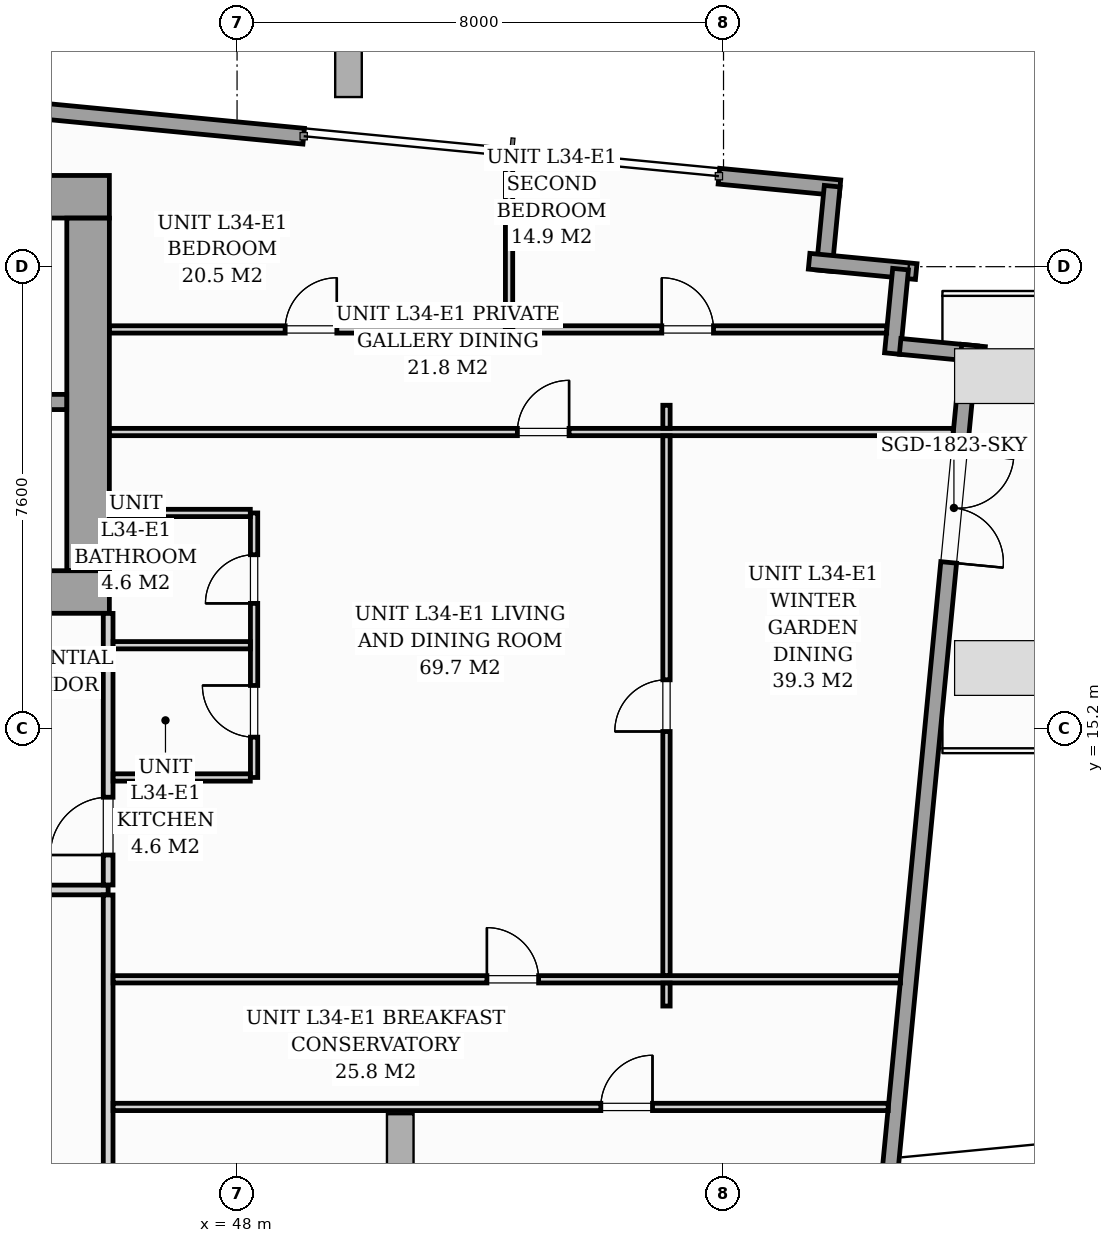
"""IFC4 building model, lengths in metres.
Left out: names, types, materials, properties, quantities, classifications, styles, units other than length and angle.
Written with IfcOpenShell. Run it as: python <this file> out.ifc"""

import sys

from ifc_helpers import new_model, si_unit, direction, frame, frame_2d, origin, origin_2d, place, context, subcontext, project, spatial, rectangle, i_section, extrude, source, transform, mapped, element, fill, save


model = new_model("IFC4")
c1 = context("Model", 3, precision=1e-05, world=origin(), true_north=direction((0.0, 1.0)))
c2 = subcontext(c1, "Body", "Model", "MODEL_VIEW")
j1 = project(units=[si_unit("LENGTHUNIT", "METRE"), si_unit("PLANEANGLEUNIT", "RADIAN")], contexts=[c1])
p1 = place(None, origin())
s1 = spatial("IfcSite", under=j1, at=p1, CompositionType="ELEMENT")
p2 = place(p1, origin())
s2 = spatial("IfcBuilding", under=s1, at=p2, CompositionType="ELEMENT")
p3 = place(p2, frame((0.0, 0.0, 119.4)))
s3 = spatial("IfcBuildingStorey", under=s2, at=p3, CompositionType="ELEMENT", Elevation=119.4)
m1 = source(origin(), c2, "Body", "SweptSolid", [
    extrude(i_section(OverallWidth=0.421, OverallDepth=0.465, WebThickness=0.045, FlangeThickness=0.073, FilletRadius=0.018, at=origin_2d()), origin(), (0.0, 0.0, 1.0), 5.196),
])
for number, where, z_axis, x_axis in (
    (1, (45.6, 17.4, 0.002), (0.0, 0.0, 1.0), (1.0, 0.0, 0.0)),
    (2, (45.6, 24.0, 0.002), (0.0, 0.0, 1.0), (1.0, 0.0, 0.0)),
):
    element("IfcColumn", number, at=place(p3, frame(where, z_axis=z_axis, x_axis=x_axis)), inside=s3, PredefinedType="PILASTER", context=c2, shape_type="MappedRepresentation", body=[
        mapped(m1, transform((0.0, 0.0, 0.0), scale=1.0)),
    ])
m2 = source(origin(), c2, "Body", "SweptSolid", [
    extrude(i_section(OverallWidth=0.438, OverallDepth=1.011, WebThickness=0.041, FlangeThickness=0.074, FilletRadius=0.024, at=origin_2d()), origin(), (0.0, 0.0, 1.0), 9.879),
])
p4 = place(p3, frame((52.668, 8.704, 0.208), z_axis=(-0.883824382848, -0.154157714467, 0.44168977728), x_axis=(0.435120582334, 0.075894256588, 0.897167844189)))
e3 = element("IfcColumn", 3, at=p4, inside=s3, PredefinedType="COLUMN", context=c2, shape_type="MappedRepresentation", body=[
    mapped(m2, transform((0.0, 0.0, 0.0), scale=1.0)),
])
m3 = source(origin(), c2, "Body", "SweptSolid", [
    extrude(i_section(OverallWidth=0.438, OverallDepth=1.011, WebThickness=0.041, FlangeThickness=0.074, FilletRadius=0.024, at=origin_2d()), origin(), (0.0, 0.0, 1.0), 11.564),
])
p5 = place(p3, frame((65.628, 9.851, 0.215), z_axis=(-0.870363070026, -0.31765876899, 0.376245973825), x_axis=(0.353441551534, 0.128996521149, 0.92651981478)))
e4 = element("IfcColumn", 4, at=p5, inside=s3, PredefinedType="COLUMN", context=c2, shape_type="MappedRepresentation", body=[
    mapped(m3, transform((0.0, 0.0, 0.0), scale=1.0)),
])
m4 = source(origin(), c2, "Body", "SweptSolid", [
    extrude(i_section(OverallWidth=0.438, OverallDepth=1.011, WebThickness=0.041, FlangeThickness=0.074, FilletRadius=0.024, at=origin_2d()), origin(), (0.0, 0.0, 1.0), 7.288),
])
p6 = place(p3, frame((51.152, 26.298, 0.186), z_axis=(-0.787175284288, -0.120828173558, 0.604777334463), x_axis=(0.597776232885, 0.091756196945, 0.796394610554)))
e5 = element("IfcColumn", 5, at=p6, inside=s3, PredefinedType="COLUMN", context=c2, shape_type="MappedRepresentation", body=[
    mapped(m4, transform((0.0, 0.0, 0.0), scale=1.0)),
])
m5 = source(origin(), c2, "Body", "SweptSolid", [
    extrude(i_section(OverallWidth=0.438, OverallDepth=1.011, WebThickness=0.041, FlangeThickness=0.074, FilletRadius=0.024, at=origin_2d()), origin(), (0.0, 0.0, 1.0), 9.236),
])
p7 = place(p3, frame((64.104, 27.401, 0.205), z_axis=(-0.763784492076, -0.438952046894, 0.473238153779), x_axis=(0.410305135913, 0.235805100953, 0.880934532078)))
e6 = element("IfcColumn", 6, at=p7, inside=s3, PredefinedType="COLUMN", context=c2, shape_type="MappedRepresentation", body=[
    mapped(m5, transform((0.0, 0.0, 0.0), scale=1.0)),
])
m6 = source(origin(), c2, "Body", "SweptSolid", [
    extrude(i_section(OverallWidth=0.438, OverallDepth=1.011, WebThickness=0.041, FlangeThickness=0.074, FilletRadius=0.024, at=origin_2d()), origin(), (0.0, 0.0, 1.0), 10.513),
])
p8 = place(p3, frame((67.234, 18.832, 0.211), z_axis=(-0.814030906227, -0.406829664935, 0.414539874362), x_axis=(0.370809581497, 0.18532016001, 0.910031149227)))
e7 = element("IfcColumn", 7, at=p8, inside=s3, PredefinedType="COLUMN", context=c2, shape_type="MappedRepresentation", body=[
    mapped(m6, transform((0.0, 0.0, 0.0), scale=1.0)),
])
p9 = place(p3, frame((44.268, 25.41, 0.0), z_axis=(0.0, 0.0, 1.0), x_axis=(0.995396292684, -0.095844772998, 0.0)))
e8 = element("IfcWall", 8, at=p9, inside=s3, PredefinedType="STANDARD", context=c2, shape_type="SweptSolid", body=[
    extrude(rectangle(XDim=4.85, YDim=0.26, at=frame_2d((2.425, 0.0))), origin(), (0.0, 0.0, 1.0), 4.78),
])
p10 = place(p3, frame((55.924, 24.288, 0.0), z_axis=(0.0, 0.0, 1.0), x_axis=(0.995396717965, -0.095840356139, 0.0)))
e9 = element("IfcWall", 9, at=p10, inside=s3, PredefinedType="STANDARD", context=c2, shape_type="SweptSolid", body=[
    extrude(rectangle(XDim=2.0, YDim=0.26, at=frame_2d((1.0, 0.0))), origin(), (0.0, 0.0, 1.0), 4.78),
])
p11 = place(p3, frame((57.787, 24.124, 0.0), z_axis=(0.0, 0.0, 1.0), x_axis=(-0.095915846097, -0.995389446633, 0.0)))
e10 = element("IfcWall", 10, at=p11, inside=s3, PredefinedType="STANDARD", context=c2, shape_type="SweptSolid", body=[
    extrude(rectangle(XDim=1.395, YDim=0.26, at=frame_2d((0.697, 0.0))), origin(), (0.0, 0.0, 1.0), 4.78),
])
p12 = place(p3, frame((57.407, 22.889, 0.0), z_axis=(0.0, 0.0, 1.0), x_axis=(0.995404477441, -0.095759732096, 0.0)))
e11 = element("IfcWall", 11, at=p12, inside=s3, PredefinedType="STANDARD", context=c2, shape_type="SweptSolid", body=[
    extrude(rectangle(XDim=1.769, YDim=0.26, at=frame_2d((0.885, 0.0))), origin(), (0.0, 0.0, 1.0), 4.78),
])
for number, where, z_axis, x_axis in (
    (12, (58.912, 22.76, 0.0), (0.0, 0.0, 1.0), (-0.096, -0.995, 0.0)),
    (13, (58.905, 21.49, 0.0), (0.0, 0.0, 1.0), (0.995, -0.096, 0.0)),
):
    element("IfcWall", number, at=place(p3, frame(where, z_axis=z_axis, x_axis=x_axis)), inside=s3, PredefinedType="STANDARD", context=c2, shape_type="SweptSolid", body=[
        extrude(rectangle(XDim=1.395, YDim=0.26, at=frame_2d((0.698, 0.0))), origin(), (0.0, 0.0, 1.0), 4.78),
    ])
p13 = place(p3, frame((60.047, 21.51, 0.0), z_axis=(0.0, 0.0, 1.0), x_axis=(-0.095849096434, -0.995395876379, 0.0)))
e14 = element("IfcWall", 14, at=p13, inside=s3, PredefinedType="STANDARD", context=c2, shape_type="SweptSolid", body=[
    extrude(rectangle(XDim=14.6, YDim=0.26, at=frame_2d((7.3, 0.0))), origin(), (0.0, 0.0, 1.0), 4.78),
])
p14 = place(p13, frame((1.79, 0.0, 0.0)))
e15 = element("IfcOpeningElement", 15, at=p14, cuts=e14, PredefinedType="OPENING", context=c2, shape_type="SweptSolid", body=[
    extrude(rectangle(XDim=1.8, YDim=2.1, at=frame_2d((0.9, 1.05))), frame((0.0, 0.14, 0.0), z_axis=(0.0, -1.0, 0.0), x_axis=(1.0, 0.0, 0.0)), (0.0, 0.0, 1.0), 0.28),
])
p15 = place(p3, frame((26.1, 17.45, 0.0), z_axis=(0.0, 0.0, 1.0), x_axis=(1.0, 0.0, 0.0)))
e16 = element("IfcWall", 16, at=p15, inside=s3, PredefinedType="SHEAR", context=c2, shape_type="SweptSolid", body=[
    extrude(rectangle(XDim=19.8, YDim=0.7, at=frame_2d((9.9, 0.0))), origin(), (0.0, 0.0, 1.0), 5.2),
])
p16 = place(p15, frame((1.05, 0.0, 0.0)))
e17 = element("IfcOpeningElement", 17, at=p16, cuts=e16, PredefinedType="OPENING", context=c2, shape_type="SweptSolid", body=[
    extrude(rectangle(XDim=0.95, YDim=2.06, at=frame_2d((0.475, 1.03))), frame((0.0, 0.36, 0.0), z_axis=(0.0, -1.0, 0.0), x_axis=(1.0, 0.0, 0.0)), (0.0, 0.0, 1.0), 0.72),
])
p17 = place(p15, frame((9.48, 0.0, 0.0)))
e18 = element("IfcOpeningElement", 18, at=p17, cuts=e16, PredefinedType="OPENING", context=c2, shape_type="SweptSolid", body=[
    extrude(rectangle(XDim=0.9, YDim=2.06, at=frame_2d((0.45, 1.03))), frame((0.0, 0.36, 0.0), z_axis=(0.0, -1.0, 0.0), x_axis=(1.0, 0.0, 0.0)), (0.0, 0.0, 1.0), 0.72),
])
p18 = place(p15, frame((17.65, 0.0, 0.0)))
e19 = element("IfcOpeningElement", 19, at=p18, cuts=e16, PredefinedType="OPENING", context=c2, shape_type="SweptSolid", body=[
    extrude(rectangle(XDim=0.95, YDim=2.06, at=frame_2d((0.475, 1.03))), frame((0.0, 0.36, 0.0), z_axis=(0.0, -1.0, 0.0), x_axis=(1.0, 0.0, 0.0)), (0.0, 0.0, 1.0), 0.72),
])
p19 = place(p3, frame((26.1, 23.95, 0.0), z_axis=(0.0, 0.0, 1.0), x_axis=(1.0, 0.0, 0.0)))
e20 = element("IfcWall", 20, at=p19, inside=s3, PredefinedType="SHEAR", context=c2, shape_type="SweptSolid", body=[
    extrude(rectangle(XDim=19.8, YDim=0.7, at=frame_2d((9.9, 0.0))), origin(), (0.0, 0.0, 1.0), 5.2),
])
p20 = place(p3, frame((45.55, 17.802, 0.0), z_axis=(0.0, 0.0, 1.0), x_axis=(0.0, 1.0, 0.0)))
e21 = element("IfcWall", 21, at=p20, inside=s3, PredefinedType="SHEAR", context=c2, shape_type="SweptSolid", body=[
    extrude(rectangle(XDim=5.796, YDim=0.7, at=frame_2d((2.898, 0.0))), origin(), (0.0, 0.0, 1.0), 5.2),
])
p21 = place(p3, frame((37.05, 20.575, 0.0), z_axis=(0.0, 0.0, 1.0), x_axis=(1.0, 0.0, 0.0)))
e22 = element("IfcWall", 22, at=p21, inside=s3, PredefinedType="SOLIDWALL", context=c2, shape_type="SweptSolid", body=[
    extrude(rectangle(XDim=8.148, YDim=0.25, at=frame_2d((4.074, 0.0))), origin(), (0.0, 0.0, 1.0), 5.2),
])
p22 = place(p21, frame((6.6, 0.0, 0.0)))
e23 = element("IfcOpeningElement", 23, at=p22, cuts=e22, PredefinedType="OPENING", context=c2, shape_type="SweptSolid", body=[
    extrude(rectangle(XDim=0.95, YDim=2.06, at=frame_2d((0.475, 1.03))), frame((0.0, 0.135, 0.0), z_axis=(0.0, -1.0, 0.0), x_axis=(1.0, 0.0, 0.0)), (0.0, 0.0, 1.0), 0.27),
])
p23 = place(p3, frame((22.05, 12.55, 0.0), z_axis=(0.0, 0.0, 1.0), x_axis=(1.0, 0.0, 0.0)))
e24 = element("IfcWall", 24, at=p23, inside=s3, PredefinedType="PARTITIONING", context=c2, shape_type="SweptSolid", body=[
    extrude(rectangle(XDim=23.83, YDim=0.16, at=frame_2d((11.915, 0.0))), origin(), (0.0, 0.0, 1.0), 4.78),
])
p24 = place(p23, frame((0.655, 0.0, 0.0)))
e25 = element("IfcOpeningElement", 25, at=p24, cuts=e24, PredefinedType="OPENING", context=c2, shape_type="SweptSolid", body=[
    extrude(rectangle(XDim=0.95, YDim=2.06, at=frame_2d((0.475, 1.03))), frame((0.0, 0.09, 0.0), z_axis=(0.0, -1.0, 0.0), x_axis=(1.0, 0.0, 0.0)), (0.0, 0.0, 1.0), 0.18),
])
p25 = place(p23, frame((12.04, 0.0, 0.0)))
e26 = element("IfcOpeningElement", 26, at=p25, cuts=e24, PredefinedType="OPENING", context=c2, shape_type="SweptSolid", body=[
    extrude(rectangle(XDim=0.95, YDim=2.06, at=frame_2d((0.475, 1.03))), frame((0.0, 0.09, 0.0), z_axis=(0.0, -1.0, 0.0), x_axis=(1.0, 0.0, 0.0)), (0.0, 0.0, 1.0), 0.18),
])
p26 = place(p3, frame((45.88, 5.776, 0.0), z_axis=(0.0, 0.0, 1.0), x_axis=(0.0, 1.0, 0.0)))
e27 = element("IfcWall", 27, at=p26, inside=s3, PredefinedType="PARTITIONING", context=c2, shape_type="SweptSolid", body=[
    extrude(rectangle(XDim=6.692, YDim=0.16, at=frame_2d((3.346, 0.0))), origin(), (0.0, 0.0, 1.0), 4.78),
])
p27 = place(p3, frame((45.88, 12.632, 0.0), z_axis=(0.0, 0.0, 1.0), x_axis=(0.0, 1.0, 0.0)))
e28 = element("IfcWall", 28, at=p27, inside=s3, PredefinedType="PARTITIONING", context=c2, shape_type="SweptSolid", body=[
    extrude(rectangle(XDim=4.466, YDim=0.16, at=frame_2d((2.233, 0.0))), origin(), (0.0, 0.0, 1.0), 4.78),
])
p28 = place(p27, frame((0.493, 0.0, 0.0)))
e29 = element("IfcOpeningElement", 29, at=p28, cuts=e28, PredefinedType="OPENING", context=c2, shape_type="SweptSolid", body=[
    extrude(rectangle(XDim=0.95, YDim=2.06, at=frame_2d((0.475, 1.03))), frame((0.0, 0.09, 0.0), z_axis=(0.0, -1.0, 0.0), x_axis=(1.0, 0.0, 0.0)), (0.0, 0.0, 1.0), 0.18),
])
p29 = place(p3, frame((48.28, 14.4, 0.0), z_axis=(0.0, 0.0, 1.0), x_axis=(0.0, 1.0, 0.0)))
e30 = element("IfcWall", 30, at=p29, inside=s3, PredefinedType="PARTITIONING", context=c2, shape_type="SweptSolid", body=[
    extrude(rectangle(XDim=4.35, YDim=0.12, at=frame_2d((2.175, 0.0))), origin(), (0.0, 0.0, 1.0), 4.78),
])
p30 = place(p29, frame((0.663, 0.0, 0.0)))
e31 = element("IfcOpeningElement", 31, at=p30, cuts=e30, PredefinedType="OPENING", context=c2, shape_type="SweptSolid", body=[
    extrude(rectangle(XDim=0.85, YDim=2.05, at=frame_2d((0.425, 1.025))), frame((0.0, 0.07, 0.0), z_axis=(0.0, -1.0, 0.0), x_axis=(1.0, 0.0, 0.0)), (0.0, 0.0, 1.0), 0.14),
])
p31 = place(p29, frame((2.863, 0.0, 0.0)))
e32 = element("IfcOpeningElement", 32, at=p31, cuts=e30, PredefinedType="OPENING", context=c2, shape_type="SweptSolid", body=[
    extrude(rectangle(XDim=0.8, YDim=2.02, at=frame_2d((0.4, 1.01))), frame((0.0, 0.07, 0.0), z_axis=(0.0, -1.0, 0.0), x_axis=(1.0, 0.0, 0.0)), (0.0, 0.0, 1.0), 0.14),
])
for number, where, z_axis, x_axis in (
    (33, (45.962, 16.575, 0.0), (0.0, 0.0, 1.0), (1.0, 0.0, 0.0)),
    (34, (45.962, 14.4, 0.0), (0.0, 0.0, 1.0), (1.0, 0.0, 0.0)),
):
    element("IfcWall", number, at=place(p3, frame(where, z_axis=z_axis, x_axis=x_axis)), inside=s3, PredefinedType="PARTITIONING", context=c2, shape_type="SweptSolid", body=[
        extrude(rectangle(XDim=2.256, YDim=0.12, at=frame_2d((1.128, 0.0))), origin(), (0.0, 0.0, 1.0), 4.78),
    ])
p32 = place(p3, frame((45.902, 18.75, 0.0), z_axis=(0.0, 0.0, 1.0), x_axis=(1.0, 0.0, 0.0)))
e35 = element("IfcWall", 35, at=p32, inside=s3, PredefinedType="PARTITIONING", context=c2, shape_type="SweptSolid", body=[
    extrude(rectangle(XDim=2.316, YDim=0.12, at=frame_2d((1.158, 0.0))), origin(), (0.0, 0.0, 1.0), 4.78),
])
p33 = place(p3, frame((52.473, 21.768, 0.0), z_axis=(0.0, 0.0, 1.0), x_axis=(0.0, 1.0, 0.0)))
e36 = element("IfcWall", 36, at=p33, inside=s3, PredefinedType="PARTITIONING", context=c2, shape_type="SweptSolid", body=[
    extrude(rectangle(XDim=2.903, YDim=0.12, at=frame_2d((1.451, 0.0))), origin(), (0.0, 0.0, 1.0), 4.78),
])
p34 = place(p3, frame((45.902, 21.768, 0.0), z_axis=(0.0, 0.0, 1.0), x_axis=(1.0, 0.0, 0.0)))
e37 = element("IfcWall", 37, at=p34, inside=s3, PredefinedType="PARTITIONING", context=c2, shape_type="SweptSolid", body=[
    extrude(rectangle(XDim=6.509, YDim=0.12, at=frame_2d((3.254, 0.0))), origin(), (0.0, 0.0, 1.0), 4.78),
])
p35 = place(p34, frame((2.889, 0.0, 0.0)))
e38 = element("IfcOpeningElement", 38, at=p35, cuts=e37, PredefinedType="OPENING", context=c2, shape_type="SweptSolid", body=[
    extrude(rectangle(XDim=0.85, YDim=2.05, at=frame_2d((0.425, 1.025))), frame((0.0, 0.07, 0.0), z_axis=(0.0, -1.0, 0.0), x_axis=(1.0, 0.0, 0.0)), (0.0, 0.0, 1.0), 0.14),
])
p36 = place(p3, frame((52.535, 21.768, 0.0), z_axis=(0.0, 0.0, 1.0), x_axis=(1.0, 0.0, 0.0)))
e39 = element("IfcWall", 39, at=p36, inside=s3, PredefinedType="PARTITIONING", context=c2, shape_type="SweptSolid", body=[
    extrude(rectangle(XDim=6.148, YDim=0.12, at=frame_2d((3.074, 0.0))), origin(), (0.0, 0.0, 1.0), 4.78),
])
p37 = place(p36, frame((2.45, 0.0, 0.0)))
e40 = element("IfcOpeningElement", 40, at=p37, cuts=e39, PredefinedType="OPENING", context=c2, shape_type="SweptSolid", body=[
    extrude(rectangle(XDim=0.85, YDim=2.05, at=frame_2d((0.425, 1.025))), frame((0.0, 0.07, 0.0), z_axis=(0.0, -1.0, 0.0), x_axis=(1.0, 0.0, 0.0)), (0.0, 0.0, 1.0), 0.14),
])
p38 = place(p3, frame((45.962, 8.982, 0.0), z_axis=(0.0, 0.0, 1.0), x_axis=(1.0, 0.0, 0.0)))
e41 = element("IfcWall", 41, at=p38, inside=s3, PredefinedType="PARTITIONING", context=c2, shape_type="SweptSolid", body=[
    extrude(rectangle(XDim=12.746, YDim=0.12, at=frame_2d((6.373, 0.0))), origin(), (0.0, 0.0, 1.0), 4.78),
])
p39 = place(p38, frame((8.02, 0.0, 0.0)))
e42 = element("IfcOpeningElement", 42, at=p39, cuts=e41, PredefinedType="OPENING", context=c2, shape_type="SweptSolid", body=[
    extrude(rectangle(XDim=0.85, YDim=2.05, at=frame_2d((0.425, 1.025))), frame((0.0, 0.07, 0.0), z_axis=(0.0, -1.0, 0.0), x_axis=(1.0, 0.0, 0.0)), (0.0, 0.0, 1.0), 0.14),
])
p40 = place(p3, frame((45.962, 11.081, 0.0), z_axis=(0.0, 0.0, 1.0), x_axis=(1.0, 0.0, 0.0)))
e43 = element("IfcWall", 43, at=p40, inside=s3, PredefinedType="PARTITIONING", context=c2, shape_type="SweptSolid", body=[
    extrude(rectangle(XDim=12.948, YDim=0.12, at=frame_2d((6.474, 0.0))), origin(), (0.0, 0.0, 1.0), 4.78),
])
p41 = place(p40, frame((6.147, 0.0, 0.0)))
e44 = element("IfcOpeningElement", 44, at=p41, cuts=e43, PredefinedType="OPENING", context=c2, shape_type="SweptSolid", body=[
    extrude(rectangle(XDim=0.85, YDim=2.05, at=frame_2d((0.425, 1.025))), frame((0.0, 0.07, 0.0), z_axis=(0.0, -1.0, 0.0), x_axis=(1.0, 0.0, 0.0)), (0.0, 0.0, 1.0), 0.14),
])
p42 = place(p3, frame((45.902, 20.081, 0.0), z_axis=(0.0, 0.0, 1.0), x_axis=(1.0, 0.0, 0.0)))
e45 = element("IfcWall", 45, at=p42, inside=s3, PredefinedType="PARTITIONING", context=c2, shape_type="SweptSolid", body=[
    extrude(rectangle(XDim=13.875, YDim=0.12, at=frame_2d((6.937, 0.0))), origin(), (0.0, 0.0, 1.0), 4.78),
])
p43 = place(p42, frame((6.708, 0.0, 0.0)))
e46 = element("IfcOpeningElement", 46, at=p43, cuts=e45, PredefinedType="OPENING", context=c2, shape_type="SweptSolid", body=[
    extrude(rectangle(XDim=0.85, YDim=2.05, at=frame_2d((0.425, 1.025))), frame((0.0, 0.07, 0.0), z_axis=(0.0, -1.0, 0.0), x_axis=(1.0, 0.0, 0.0)), (0.0, 0.0, 1.0), 0.14),
])
p44 = place(p3, frame((55.062, 10.641, 0.0), z_axis=(0.0, 0.0, 1.0), x_axis=(0.0, 1.0, 0.0)))
e47 = element("IfcWall", 47, at=p44, inside=s3, PredefinedType="PARTITIONING", context=c2, shape_type="SweptSolid", body=[
    extrude(rectangle(XDim=0.378, YDim=0.12, at=frame_2d((0.189, 0.0))), origin(), (0.0, 0.0, 1.0), 4.78),
])
p45 = place(p3, frame((55.062, 11.143, 0.0), z_axis=(0.0, 0.0, 1.0), x_axis=(0.0, 1.0, 0.0)))
e48 = element("IfcWall", 48, at=p45, inside=s3, PredefinedType="PARTITIONING", context=c2, shape_type="SweptSolid", body=[
    extrude(rectangle(XDim=8.876, YDim=0.12, at=frame_2d((4.438, 0.0))), origin(), (0.0, 0.0, 1.0), 4.78),
])
p46 = place(p45, frame((4.013, 0.0, 0.0)))
e49 = element("IfcOpeningElement", 49, at=p46, cuts=e48, PredefinedType="OPENING", context=c2, shape_type="SweptSolid", body=[
    extrude(rectangle(XDim=0.85, YDim=2.05, at=frame_2d((0.425, 1.025))), frame((0.0, 0.07, 0.0), z_axis=(0.0, -1.0, 0.0), x_axis=(1.0, 0.0, 0.0)), (0.0, 0.0, 1.0), 0.14),
])
p47 = place(p3, frame((55.062, 20.143, 0.0), z_axis=(0.0, 0.0, 1.0), x_axis=(0.0, 1.0, 0.0)))
e50 = element("IfcWall", 50, at=p47, inside=s3, PredefinedType="PARTITIONING", context=c2, shape_type="SweptSolid", body=[
    extrude(rectangle(XDim=0.378, YDim=0.12, at=frame_2d((0.189, 0.0))), origin(), (0.0, 0.0, 1.0), 4.78),
])
m7 = source(origin(), c2, "Body", "SweptSolid", [
    extrude(rectangle(XDim=1.8, YDim=2.1, at=frame_2d((0.9, 1.05))), frame((0.0, 0.025, 0.0), z_axis=(0.0, -1.0, 0.0), x_axis=(1.0, 0.0, 0.0)), (0.0, 0.0, 1.0), 0.05),
])
p48 = place(p14, origin())
e51 = element("IfcDoor", 51, at=p48, inside=s3, OperationType="DOUBLE_DOOR_SINGLE_SWING", PredefinedType="DOOR", context=c2, shape_type="MappedRepresentation", body=[
    mapped(m7, transform((0.0, 0.0, 0.0), scale=1.0)),
])
fill(e15, e51)
m8 = source(origin(), c2, "Body", "SweptSolid", [
    extrude(rectangle(XDim=0.95, YDim=2.06, at=frame_2d((0.475, 1.03))), frame((0.0, 0.025, 0.0), z_axis=(0.0, -1.0, 0.0), x_axis=(1.0, 0.0, 0.0)), (0.0, 0.0, 1.0), 0.05),
])
p49 = place(p28, origin())
e52 = element("IfcDoor", 52, at=p49, inside=s3, OperationType="SINGLE_SWING_LEFT", PredefinedType="DOOR", context=c2, shape_type="MappedRepresentation", body=[
    mapped(m8, transform((0.0, 0.0, 0.0), scale=1.0)),
])
fill(e29, e52)
m9 = source(origin(), c2, "Body", "SweptSolid", [
    extrude(rectangle(XDim=0.85, YDim=2.05, at=frame_2d((0.425, 1.025))), frame((0.0, 0.025, 0.0), z_axis=(0.0, -1.0, 0.0), x_axis=(1.0, 0.0, 0.0)), (0.0, 0.0, 1.0), 0.05),
])
p50 = place(p30, origin())
e53 = element("IfcDoor", 53, at=p50, inside=s3, OperationType="SINGLE_SWING_RIGHT", PredefinedType="DOOR", context=c2, shape_type="MappedRepresentation", body=[
    mapped(m9, transform((0.0, 0.0, 0.0), scale=1.0)),
])
fill(e31, e53)
m10 = source(origin(), c2, "Body", "SweptSolid", [
    extrude(rectangle(XDim=0.8, YDim=2.02, at=frame_2d((0.4, 1.01))), frame((0.0, 0.025, 0.0), z_axis=(0.0, -1.0, 0.0), x_axis=(1.0, 0.0, 0.0)), (0.0, 0.0, 1.0), 0.05),
])
p51 = place(p31, origin())
e54 = element("IfcDoor", 54, at=p51, inside=s3, OperationType="SINGLE_SWING_LEFT", PredefinedType="DOOR", context=c2, shape_type="MappedRepresentation", body=[
    mapped(m10, transform((0.0, 0.0, 0.0), scale=1.0)),
])
fill(e32, e54)
p52 = place(p35, origin())
e55 = element("IfcDoor", 55, at=p52, inside=s3, OperationType="SINGLE_SWING_RIGHT", PredefinedType="DOOR", context=c2, shape_type="MappedRepresentation", body=[
    mapped(m9, transform((0.0, 0.0, 0.0), scale=1.0)),
])
fill(e38, e55)
p53 = place(p37, origin())
e56 = element("IfcDoor", 56, at=p53, inside=s3, OperationType="SINGLE_SWING_LEFT", PredefinedType="DOOR", context=c2, shape_type="MappedRepresentation", body=[
    mapped(m9, transform((0.0, 0.0, 0.0), scale=1.0)),
])
fill(e40, e56)
p54 = place(p39, origin())
e57 = element("IfcDoor", 57, at=p54, inside=s3, OperationType="SINGLE_SWING_RIGHT", PredefinedType="DOOR", context=c2, shape_type="MappedRepresentation", body=[
    mapped(m9, transform((0.0, 0.0, 0.0), scale=1.0)),
])
fill(e42, e57)
p55 = place(p41, origin())
e58 = element("IfcDoor", 58, at=p55, inside=s3, OperationType="SINGLE_SWING_LEFT", PredefinedType="DOOR", context=c2, shape_type="MappedRepresentation", body=[
    mapped(m9, transform((0.0, 0.0, 0.0), scale=1.0)),
])
fill(e44, e58)
p56 = place(p43, origin())
e59 = element("IfcDoor", 59, at=p56, inside=s3, OperationType="SINGLE_SWING_RIGHT", PredefinedType="DOOR", context=c2, shape_type="MappedRepresentation", body=[
    mapped(m9, transform((0.0, 0.0, 0.0), scale=1.0)),
])
fill(e46, e59)
p57 = place(p46, origin())
e60 = element("IfcDoor", 60, at=p57, inside=s3, OperationType="SINGLE_SWING_LEFT", PredefinedType="DOOR", context=c2, shape_type="MappedRepresentation", body=[
    mapped(m9, transform((0.0, 0.0, 0.0), scale=1.0)),
])
fill(e49, e60)
save(model, sys.argv[1])
